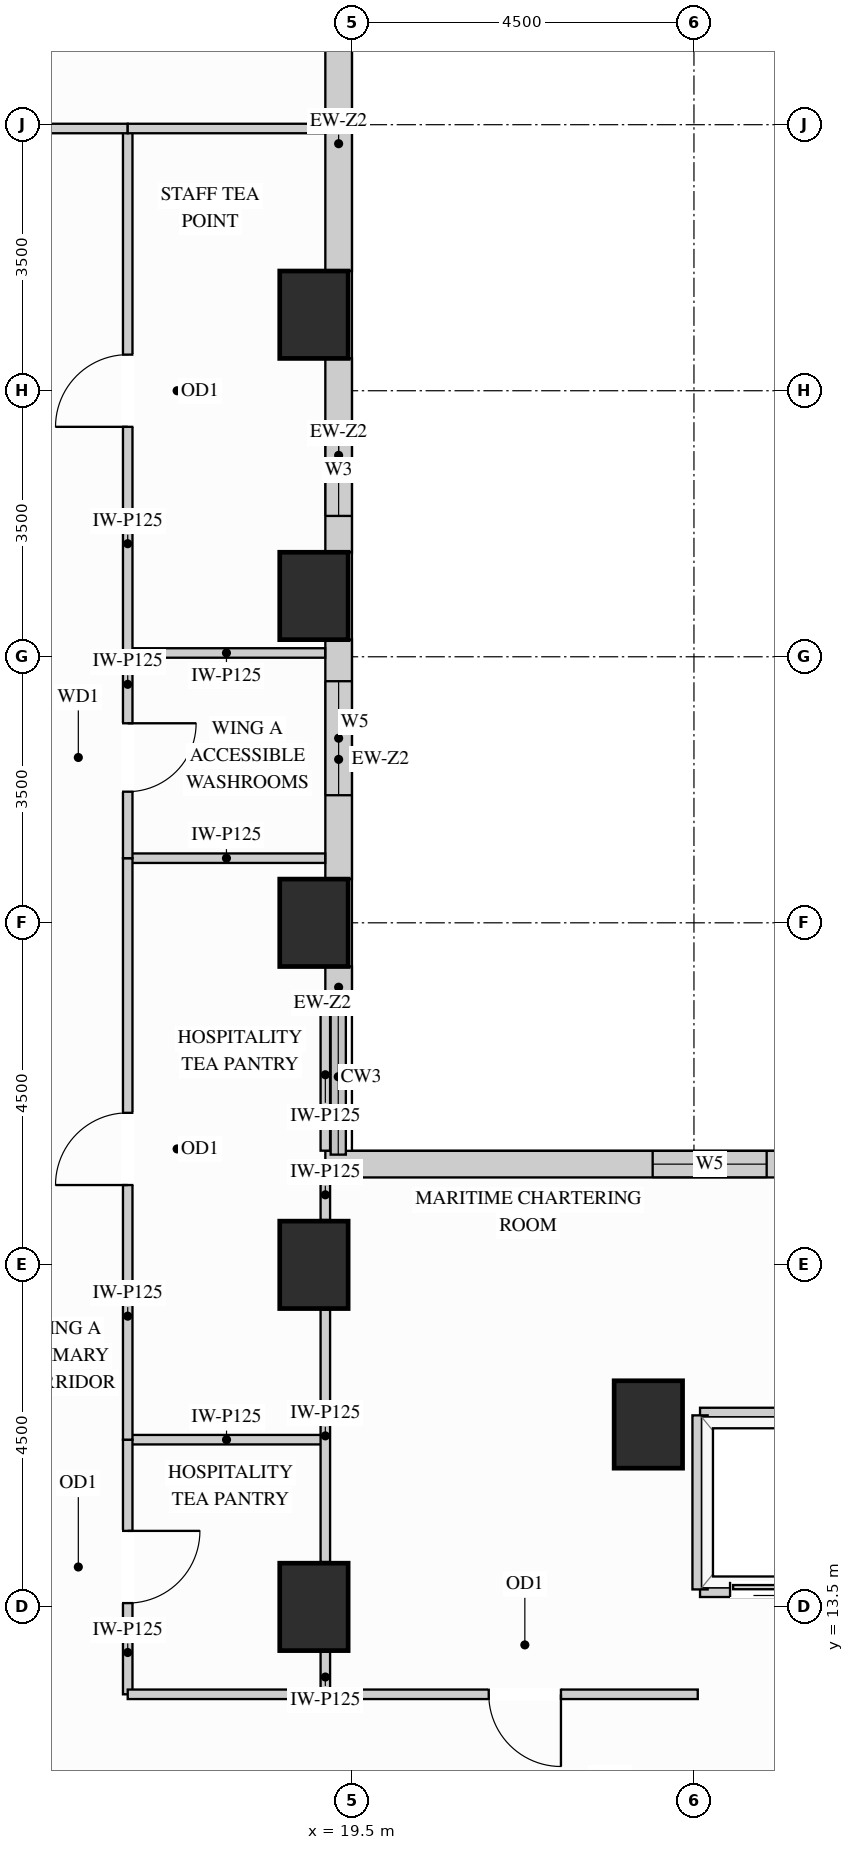
"""IFC4 building model, lengths in metres.
Left out: names, types, materials, properties, quantities, classifications, styles, units other than length and angle.
Written with IfcOpenShell. Run it as: python <this file> out.ifc"""

import sys

from ifc_helpers import new_model, si_unit, direction, frame, frame_2d, origin, origin_2d, place, context, subcontext, project, spatial, rectangle, extrude, source, transform, mapped, element, fill, save


model = new_model("IFC4")
c1 = context("Model", 3, precision=1e-05, world=origin(), true_north=direction((0.0, 1.0)))
c2 = subcontext(c1, "Body", "Model", "MODEL_VIEW")
j1 = project(units=[si_unit("LENGTHUNIT", "METRE"), si_unit("PLANEANGLEUNIT", "RADIAN")], contexts=[c1])
p1 = place(None, origin())
s1 = spatial("IfcSite", under=j1, at=p1, CompositionType="ELEMENT")
p2 = place(p1, origin())
s2 = spatial("IfcBuilding", under=s1, at=p2, CompositionType="ELEMENT")
p3 = place(p2, frame((0.0, 0.0, 124.2)))
s3 = spatial("IfcBuildingStorey", under=s2, at=p3, CompositionType="ELEMENT", Elevation=124.2)
m1 = source(origin(), c2, "Body", "SweptSolid", [
    extrude(rectangle(XDim=0.9, YDim=1.15, at=origin_2d()), origin(), (0.0, 0.0, 1.0), 3.38),
])
for number, where, z_axis, x_axis in (
    (1, (19.0, 13.5, 0.0), (0.0, 0.0, 1.0), (1.0, 0.0, 0.0)),
    (2, (19.0, 18.0, 0.0), (0.0, 0.0, 1.0), (1.0, 0.0, 0.0)),
    (3, (19.0, 22.5, 0.0), (0.0, 0.0, 1.0), (1.0, 0.0, 0.0)),
    (4, (19.0, 26.8, 0.0), (0.0, 0.0, 1.0), (1.0, 0.0, 0.0)),
    (5, (19.0, 30.5, 0.0), (0.0, 0.0, 1.0), (1.0, 0.0, 0.0)),
    (6, (23.4, 15.9, 0.0), (0.0, 0.0, 1.0), (1.0, 0.0, 0.0)),
):
    element("IfcColumn", number, at=place(p3, frame(where, z_axis=z_axis, x_axis=x_axis)), inside=s3, PredefinedType="COLUMN", context=c2, shape_type="MappedRepresentation", body=[
        mapped(m1, transform((0.0, 0.0, 0.0), x_axis=(1.0, 0.0, 0.0), y_axis=(0.0, 1.0, 0.0), z_axis=(0.0, 0.0, 1.0))),
    ])
m2 = source(origin(), c2, "Body", "SweptSolid", [
    extrude(rectangle(XDim=0.427, YDim=0.35, at=frame_2d((0.213, 0.0))), origin(), (0.0, 0.0, 1.0), 2.519),
])
p4 = place(p3, frame((19.325, 21.5, 0.0), z_axis=(0.0, 0.0, 1.0), x_axis=(0.0, 1.0, 0.0)))
e7 = element("IfcWall", 7, at=p4, inside=s3, PredefinedType="SOLIDWALL", context=c2, shape_type="MappedRepresentation", body=[
    mapped(m2, transform((0.0, 0.0, 0.0), x_axis=(1.0, 0.0, 0.0), y_axis=(0.0, 1.0, 0.0), z_axis=(0.0, 0.0, 1.0))),
])
p5 = place(p3, frame((19.325, 23.073, 0.0), z_axis=(0.0, 0.0, 1.0), x_axis=(0.0, 1.0, 0.0)))
e8 = element("IfcWall", 8, at=p5, inside=s3, PredefinedType="SOLIDWALL", context=c2, shape_type="SweptSolid", body=[
    extrude(rectangle(XDim=3.154, YDim=0.35, at=frame_2d((1.577, 0.0))), origin(), (0.0, 0.0, 1.0), 2.519),
])
p6 = place(p5, frame((1.105, 0.0, 0.78)))
e9 = element("IfcOpeningElement", 9, at=p6, cuts=e8, PredefinedType="OPENING", context=c2, shape_type="SweptSolid", body=[
    extrude(rectangle(XDim=1.5, YDim=1.559, at=frame_2d((0.75, 0.78))), frame((0.0, 0.185, 0.0), z_axis=(0.0, -1.0, 0.0), x_axis=(1.0, 0.0, 0.0)), (0.0, 0.0, 1.0), 0.37),
])
p7 = place(p3, frame((19.325, 27.373, 0.0), z_axis=(0.0, 0.0, 1.0), x_axis=(0.0, 1.0, 0.0)))
e10 = element("IfcWall", 10, at=p7, inside=s3, PredefinedType="SOLIDWALL", context=c2, shape_type="SweptSolid", body=[
    extrude(rectangle(XDim=2.554, YDim=0.35, at=frame_2d((1.277, 0.0))), origin(), (0.0, 0.0, 1.0), 2.519),
])
p8 = place(p7, frame((0.48, 0.0, 0.78)))
e11 = element("IfcOpeningElement", 11, at=p8, cuts=e10, PredefinedType="OPENING", context=c2, shape_type="SweptSolid", body=[
    extrude(rectangle(XDim=1.2, YDim=1.559, at=frame_2d((0.6, 0.78))), frame((0.0, 0.185, 0.0), z_axis=(0.0, -1.0, 0.0), x_axis=(1.0, 0.0, 0.0)), (0.0, 0.0, 1.0), 0.37),
])
m3 = source(origin(), c2, "Body", "SweptSolid", [
    extrude(rectangle(XDim=3.354, YDim=0.35, at=frame_2d((1.677, 0.0))), origin(), (0.0, 0.0, 1.0), 2.519),
])
p9 = place(p3, frame((19.325, 31.073, 0.0), z_axis=(0.0, 0.0, 1.0), x_axis=(0.0, 1.0, 0.0)))
e12 = element("IfcWall", 12, at=p9, inside=s3, PredefinedType="SOLIDWALL", context=c2, shape_type="MappedRepresentation", body=[
    mapped(m3, transform((0.0, 0.0, 0.0), x_axis=(1.0, 0.0, 0.0), y_axis=(0.0, 1.0, 0.0), z_axis=(0.0, 0.0, 1.0))),
])
p10 = place(p3, frame((34.75, 19.325, 0.0), z_axis=(0.0, 0.0, 1.0), x_axis=(-1.0, 0.0, 0.0)))
e13 = element("IfcWall", 13, at=p10, inside=s3, PredefinedType="SOLIDWALL", context=c2, shape_type="SweptSolid", body=[
    extrude(rectangle(XDim=15.6, YDim=0.35, at=frame_2d((7.8, 0.0))), origin(), (0.0, 0.0, 1.0), 3.365),
])
p11 = place(p10, frame((4.307, 0.0, 0.78)))
e14 = element("IfcOpeningElement", 14, at=p11, cuts=e13, PredefinedType="OPENING", context=c2, shape_type="SweptSolid", body=[
    extrude(rectangle(XDim=1.5, YDim=2.0, at=frame_2d((0.75, 1.0))), frame((0.0, 0.185, 0.0), z_axis=(0.0, -1.0, 0.0), x_axis=(1.0, 0.0, 0.0)), (0.0, 0.0, 1.0), 0.37),
])
p12 = place(p10, frame((9.793, 0.0, 0.78)))
e15 = element("IfcOpeningElement", 15, at=p12, cuts=e13, PredefinedType="OPENING", context=c2, shape_type="SweptSolid", body=[
    extrude(rectangle(XDim=1.5, YDim=2.0, at=frame_2d((0.75, 1.0))), frame((0.0, 0.185, 0.0), z_axis=(0.0, -1.0, 0.0), x_axis=(1.0, 0.0, 0.0)), (0.0, 0.0, 1.0), 0.37),
])
m4 = source(origin(), c2, "Body", "SweptSolid", [
    extrude(rectangle(XDim=2.6, YDim=0.125, at=frame_2d((1.3, 0.0))), origin(), (0.0, 0.0, 1.0), 3.365),
])
p13 = place(p3, frame((16.55, 15.7, 0.0), z_axis=(0.0, 0.0, 1.0), x_axis=(1.0, 0.0, 0.0)))
e16 = element("IfcWall", 16, at=p13, inside=s3, PredefinedType="PARTITIONING", context=c2, shape_type="MappedRepresentation", body=[
    mapped(m4, transform((0.0, 0.0, 0.0), x_axis=(1.0, 0.0, 0.0), y_axis=(0.0, 1.0, 0.0), z_axis=(0.0, 0.0, 1.0))),
])
m5 = source(origin(), c2, "Body", "SweptSolid", [
    extrude(rectangle(XDim=2.598, YDim=0.125, at=frame_2d((1.299, 0.0))), origin(), (0.0, 0.0, 1.0), 3.365),
])
for number, where, z_axis, x_axis in (
    (17, (16.55, 23.35, 0.0), (0.0, 0.0, 1.0), (1.0, 0.0, 0.0)),
    (18, (16.55, 26.05, 0.0), (0.0, 0.0, 1.0), (1.0, 0.0, 0.0)),
):
    element("IfcWall", number, at=place(p3, frame(where, z_axis=z_axis, x_axis=x_axis)), inside=s3, PredefinedType="PARTITIONING", context=c2, shape_type="MappedRepresentation", body=[
        mapped(m5, transform((0.0, 0.0, 0.0), x_axis=(1.0, 0.0, 0.0), y_axis=(0.0, 1.0, 0.0), z_axis=(0.0, 0.0, 1.0))),
    ])
m6 = source(origin(), c2, "Body", "SweptSolid", [
    extrude(rectangle(XDim=0.56, YDim=0.125, at=frame_2d((0.28, 0.0))), origin(), (0.0, 0.0, 1.0), 2.677),
])
p14 = place(p3, frame((19.15, 12.35, 0.0), z_axis=(0.0, 0.0, 1.0), x_axis=(0.0, 1.0, 0.0)))
e19 = element("IfcWall", 19, at=p14, inside=s3, PredefinedType="PARTITIONING", context=c2, shape_type="MappedRepresentation", body=[
    mapped(m6, transform((0.0, 0.0, 0.0), x_axis=(1.0, 0.0, 0.0), y_axis=(0.0, 1.0, 0.0), z_axis=(0.0, 0.0, 1.0))),
])
m7 = source(origin(), c2, "Body", "SweptSolid", [
    extrude(rectangle(XDim=3.32, YDim=0.125, at=frame_2d((1.66, 0.0))), origin(), (0.0, 0.0, 1.0), 2.677),
])
p15 = place(p3, frame((19.15, 14.09, 0.0), z_axis=(0.0, 0.0, 1.0), x_axis=(0.0, 1.0, 0.0)))
e20 = element("IfcWall", 20, at=p15, inside=s3, PredefinedType="PARTITIONING", context=c2, shape_type="MappedRepresentation", body=[
    mapped(m7, transform((0.0, 0.0, 0.0), x_axis=(1.0, 0.0, 0.0), y_axis=(0.0, 1.0, 0.0), z_axis=(0.0, 0.0, 1.0))),
])
m8 = source(origin(), c2, "Body", "SweptSolid", [
    extrude(rectangle(XDim=0.558, YDim=0.125, at=frame_2d((0.279, 0.0))), origin(), (0.0, 0.0, 1.0), 2.519),
])
p16 = place(p3, frame((19.15, 18.59, 0.0), z_axis=(0.0, 0.0, 1.0), x_axis=(0.0, 1.0, 0.0)))
e21 = element("IfcWall", 21, at=p16, inside=s3, PredefinedType="PARTITIONING", context=c2, shape_type="MappedRepresentation", body=[
    mapped(m8, transform((0.0, 0.0, 0.0), x_axis=(1.0, 0.0, 0.0), y_axis=(0.0, 1.0, 0.0), z_axis=(0.0, 0.0, 1.0))),
])
m9 = source(origin(), c2, "Body", "SweptSolid", [
    extrude(rectangle(XDim=1.998, YDim=0.125, at=frame_2d((0.999, 0.0))), origin(), (0.0, 0.0, 1.0), 2.519),
])
p17 = place(p3, frame((19.15, 19.502, 0.0), z_axis=(0.0, 0.0, 1.0), x_axis=(0.0, 1.0, 0.0)))
e22 = element("IfcWall", 22, at=p17, inside=s3, PredefinedType="PARTITIONING", context=c2, shape_type="MappedRepresentation", body=[
    mapped(m9, transform((0.0, 0.0, 0.0), x_axis=(1.0, 0.0, 0.0), y_axis=(0.0, 1.0, 0.0), z_axis=(0.0, 0.0, 1.0))),
])
p18 = place(p3, frame((16.55, 12.35, 0.0), z_axis=(0.0, 0.0, 1.0), x_axis=(0.0, 1.0, 0.0)))
e23 = element("IfcWall", 23, at=p18, inside=s3, PredefinedType="PARTITIONING", context=c2, shape_type="SweptSolid", body=[
    extrude(rectangle(XDim=3.35, YDim=0.125, at=frame_2d((1.675, 0.0))), origin(), (0.0, 0.0, 1.0), 3.365),
])
p19 = place(p18, frame((1.2, 0.0, 0.0)))
e24 = element("IfcOpeningElement", 24, at=p19, cuts=e23, PredefinedType="OPENING", context=c2, shape_type="SweptSolid", body=[
    extrude(rectangle(XDim=0.95, YDim=2.15, at=frame_2d((0.475, 1.075))), frame((0.0, 0.073, 0.0), z_axis=(0.0, -1.0, 0.0), x_axis=(1.0, 0.0, 0.0)), (0.0, 0.0, 1.0), 0.145),
])
p20 = place(p3, frame((16.55, 15.7, 0.0), z_axis=(0.0, 0.0, 1.0), x_axis=(0.0, 1.0, 0.0)))
e25 = element("IfcWall", 25, at=p20, inside=s3, PredefinedType="PARTITIONING", context=c2, shape_type="SweptSolid", body=[
    extrude(rectangle(XDim=7.65, YDim=0.125, at=frame_2d((3.825, 0.0))), origin(), (0.0, 0.0, 1.0), 3.365),
])
p21 = place(p20, frame((3.35, 0.0, 0.0)))
e26 = element("IfcOpeningElement", 26, at=p21, cuts=e25, PredefinedType="OPENING", context=c2, shape_type="SweptSolid", body=[
    extrude(rectangle(XDim=0.95, YDim=2.15, at=frame_2d((0.475, 1.075))), frame((0.0, 0.073, 0.0), z_axis=(0.0, -1.0, 0.0), x_axis=(1.0, 0.0, 0.0)), (0.0, 0.0, 1.0), 0.145),
])
p22 = place(p3, frame((16.55, 26.05, 0.0), z_axis=(0.0, 0.0, 1.0), x_axis=(0.0, 1.0, 0.0)))
e27 = element("IfcWall", 27, at=p22, inside=s3, PredefinedType="PARTITIONING", context=c2, shape_type="SweptSolid", body=[
    extrude(rectangle(XDim=6.9, YDim=0.125, at=frame_2d((3.45, 0.0))), origin(), (0.0, 0.0, 1.0), 3.365),
])
p23 = place(p22, frame((2.975, 0.0, 0.0)))
e28 = element("IfcOpeningElement", 28, at=p23, cuts=e27, PredefinedType="OPENING", context=c2, shape_type="SweptSolid", body=[
    extrude(rectangle(XDim=0.95, YDim=2.15, at=frame_2d((0.475, 1.075))), frame((0.0, 0.073, 0.0), z_axis=(0.0, -1.0, 0.0), x_axis=(1.0, 0.0, 0.0)), (0.0, 0.0, 1.0), 0.145),
])
p24 = place(p3, frame((16.55, 23.35, 0.0), z_axis=(0.0, 0.0, 1.0), x_axis=(0.0, 1.0, 0.0)))
e29 = element("IfcWall", 29, at=p24, inside=s3, PredefinedType="PARTITIONING", context=c2, shape_type="SweptSolid", body=[
    extrude(rectangle(XDim=2.7, YDim=0.125, at=frame_2d((1.35, 0.0))), origin(), (0.0, 0.0, 1.0), 3.365),
])
p25 = place(p24, frame((0.875, 0.0, 0.0)))
e30 = element("IfcOpeningElement", 30, at=p25, cuts=e29, PredefinedType="OPENING", context=c2, shape_type="SweptSolid", body=[
    extrude(rectangle(XDim=0.9, YDim=2.15, at=frame_2d((0.45, 1.075))), frame((0.0, 0.073, 0.0), z_axis=(0.0, -1.0, 0.0), x_axis=(1.0, 0.0, 0.0)), (0.0, 0.0, 1.0), 0.145),
])
p26 = place(p3, frame((2.45, 32.95, 0.0), z_axis=(0.0, 0.0, 1.0), x_axis=(1.0, 0.0, 0.0)))
e31 = element("IfcWall", 31, at=p26, inside=s3, PredefinedType="PARTITIONING", context=c2, shape_type="SweptSolid", body=[
    extrude(rectangle(XDim=14.1, YDim=0.125, at=frame_2d((7.05, 0.0))), origin(), (0.0, 0.0, 1.0), 3.365),
])
p27 = place(p26, frame((6.575, 0.0, 0.0)))
e32 = element("IfcOpeningElement", 32, at=p27, cuts=e31, PredefinedType="OPENING", context=c2, shape_type="SweptSolid", body=[
    extrude(rectangle(XDim=0.95, YDim=2.15, at=frame_2d((0.475, 1.075))), frame((0.0, 0.073, 0.0), z_axis=(0.0, -1.0, 0.0), x_axis=(1.0, 0.0, 0.0)), (0.0, 0.0, 1.0), 0.145),
])
p28 = place(p3, frame((16.55, 32.95, 0.0), z_axis=(0.0, 0.0, 1.0), x_axis=(1.0, 0.0, 0.0)))
e33 = element("IfcWall", 33, at=p28, inside=s3, PredefinedType="PARTITIONING", context=c2, shape_type="MappedRepresentation", body=[
    mapped(m5, transform((0.0, 0.0, 0.0), x_axis=(1.0, 0.0, 0.0), y_axis=(0.0, 1.0, 0.0), z_axis=(0.0, 0.0, 1.0))),
])
m10 = source(origin(), c2, "Body", "SweptSolid", [
    extrude(rectangle(XDim=2.95, YDim=0.125, at=frame_2d((1.475, 0.0))), origin(), (0.0, 0.0, 1.0), 3.365),
])
p29 = place(p3, frame((16.55, 12.35, 0.0), z_axis=(0.0, 0.0, 1.0), x_axis=(1.0, 0.0, 0.0)))
e34 = element("IfcWall", 34, at=p29, inside=s3, PredefinedType="PARTITIONING", context=c2, shape_type="MappedRepresentation", body=[
    mapped(m10, transform((0.0, 0.0, 0.0), x_axis=(1.0, 0.0, 0.0), y_axis=(0.0, 1.0, 0.0), z_axis=(0.0, 0.0, 1.0))),
])
p30 = place(p3, frame((19.5, 12.35, 0.0), z_axis=(0.0, 0.0, 1.0), x_axis=(1.0, 0.0, 0.0)))
e35 = element("IfcWall", 35, at=p30, inside=s3, PredefinedType="PARTITIONING", context=c2, shape_type="SweptSolid", body=[
    extrude(rectangle(XDim=4.55, YDim=0.125, at=frame_2d((2.275, 0.0))), origin(), (0.0, 0.0, 1.0), 3.365),
])
p31 = place(p30, frame((1.8, 0.0, 0.0)))
e36 = element("IfcOpeningElement", 36, at=p31, cuts=e35, PredefinedType="OPENING", context=c2, shape_type="SweptSolid", body=[
    extrude(rectangle(XDim=0.95, YDim=2.15, at=frame_2d((0.475, 1.075))), frame((0.0, 0.073, 0.0), z_axis=(0.0, -1.0, 0.0), x_axis=(1.0, 0.0, 0.0)), (0.0, 0.0, 1.0), 0.145),
])
m11 = source(origin(), c2, "Body", "SweptSolid", [
    extrude(rectangle(XDim=1.89, YDim=0.2, at=frame_2d((0.945, 0.0))), origin(), (0.0, 0.0, 1.0), 2.677),
])
p32 = place(p3, frame((24.08, 16.02, 0.0), z_axis=(0.0, 0.0, 1.0), x_axis=(1.0, 0.0, 0.0)))
e37 = element("IfcWall", 37, at=p32, inside=s3, PredefinedType="PARTITIONING", context=c2, shape_type="MappedRepresentation", body=[
    mapped(m11, transform((0.0, 0.0, 0.0), x_axis=(1.0, 0.0, 0.0), y_axis=(0.0, 1.0, 0.0), z_axis=(0.0, 0.0, 1.0))),
])
p33 = place(p3, frame((24.08, 13.73, 0.0), z_axis=(0.0, 0.0, 1.0), x_axis=(1.0, 0.0, 0.0)))
e38 = element("IfcWall", 38, at=p33, inside=s3, PredefinedType="PARTITIONING", context=c2, shape_type="SweptSolid", body=[
    extrude(rectangle(XDim=1.89, YDim=0.2, at=frame_2d((0.945, 0.0))), origin(), (0.0, 0.0, 1.0), 2.446),
])
p34 = place(p33, frame((0.395, 0.0, 0.0)))
e39 = element("IfcOpeningElement", 39, at=p34, cuts=e38, PredefinedType="OPENING", context=c2, shape_type="SweptSolid", body=[
    extrude(rectangle(XDim=1.1, YDim=2.2, at=frame_2d((0.55, 1.1))), frame((0.0, 0.11, 0.0), z_axis=(0.0, -1.0, 0.0), x_axis=(1.0, 0.0, 0.0)), (0.0, 0.0, 1.0), 0.22),
])
m12 = source(origin(), c2, "Body", "SweptSolid", [
    extrude(rectangle(XDim=2.29, YDim=0.2, at=frame_2d((1.145, 0.0))), origin(), (0.0, 0.0, 1.0), 3.365),
])
p35 = place(p3, frame((24.08, 13.73, 0.0), z_axis=(0.0, 0.0, 1.0), x_axis=(0.0, 1.0, 0.0)))
e40 = element("IfcWall", 40, at=p35, inside=s3, PredefinedType="PARTITIONING", context=c2, shape_type="MappedRepresentation", body=[
    mapped(m12, transform((0.0, 0.0, 0.0), x_axis=(1.0, 0.0, 0.0), y_axis=(0.0, 1.0, 0.0), z_axis=(0.0, 0.0, 1.0))),
])
m13 = source(origin(), c2, "Body", "SweptSolid", [
    extrude(rectangle(XDim=1.1, YDim=2.2, at=frame_2d((0.55, 1.1))), frame((0.0, 0.025, 0.0), z_axis=(0.0, -1.0, 0.0), x_axis=(1.0, 0.0, 0.0)), (0.0, 0.0, 1.0), 0.05),
])
p36 = place(p34, origin())
e41 = element("IfcDoor", 41, at=p36, inside=s3, OperationType="SLIDING_TO_LEFT", PredefinedType="DOOR", context=c2, shape_type="MappedRepresentation", body=[
    mapped(m13, transform((0.0, 0.0, 0.0), x_axis=(1.0, 0.0, 0.0), y_axis=(0.0, 1.0, 0.0), z_axis=(0.0, 0.0, 1.0))),
])
fill(e39, e41)
m14 = source(origin(), c2, "Body", "SweptSolid", [
    extrude(rectangle(XDim=0.95, YDim=2.15, at=frame_2d((0.475, 1.075))), frame((0.0, 0.025, 0.0), z_axis=(0.0, -1.0, 0.0), x_axis=(1.0, 0.0, 0.0)), (0.0, 0.0, 1.0), 0.05),
])
p37 = place(p19, origin())
e42 = element("IfcDoor", 42, at=p37, inside=s3, OperationType="SINGLE_SWING_RIGHT", PredefinedType="DOOR", context=c2, shape_type="MappedRepresentation", body=[
    mapped(m14, transform((0.0, 0.0, 0.0), x_axis=(1.0, 0.0, 0.0), y_axis=(0.0, 1.0, 0.0), z_axis=(0.0, 0.0, 1.0))),
])
fill(e24, e42)
p38 = place(p21, origin())
e43 = element("IfcDoor", 43, at=p38, inside=s3, OperationType="SINGLE_SWING_LEFT", PredefinedType="DOOR", context=c2, shape_type="MappedRepresentation", body=[
    mapped(m14, transform((0.0, 0.0, 0.0), x_axis=(1.0, 0.0, 0.0), y_axis=(0.0, 1.0, 0.0), z_axis=(0.0, 0.0, 1.0))),
])
fill(e26, e43)
p39 = place(p23, origin())
e44 = element("IfcDoor", 44, at=p39, inside=s3, OperationType="SINGLE_SWING_LEFT", PredefinedType="DOOR", context=c2, shape_type="MappedRepresentation", body=[
    mapped(m14, transform((0.0, 0.0, 0.0), x_axis=(1.0, 0.0, 0.0), y_axis=(0.0, 1.0, 0.0), z_axis=(0.0, 0.0, 1.0))),
])
fill(e28, e44)
p40 = place(p31, origin())
e45 = element("IfcDoor", 45, at=p40, inside=s3, OperationType="SINGLE_SWING_RIGHT", PredefinedType="DOOR", context=c2, shape_type="MappedRepresentation", body=[
    mapped(m14, transform((0.0, 0.0, 0.0), x_axis=(1.0, 0.0, 0.0), y_axis=(0.0, 1.0, 0.0), z_axis=(0.0, 0.0, 1.0))),
])
fill(e36, e45)
m15 = source(origin(), c2, "Body", "SweptSolid", [
    extrude(rectangle(XDim=0.9, YDim=2.15, at=frame_2d((0.45, 1.075))), frame((0.0, 0.025, 0.0), z_axis=(0.0, -1.0, 0.0), x_axis=(1.0, 0.0, 0.0)), (0.0, 0.0, 1.0), 0.05),
])
p41 = place(p25, origin())
e46 = element("IfcDoor", 46, at=p41, inside=s3, OperationType="SINGLE_SWING_RIGHT", PredefinedType="DOOR", context=c2, shape_type="MappedRepresentation", body=[
    mapped(m15, transform((0.0, 0.0, 0.0), x_axis=(1.0, 0.0, 0.0), y_axis=(0.0, 1.0, 0.0), z_axis=(0.0, 0.0, 1.0))),
])
fill(e30, e46)
m16 = source(origin(), c2, "Body", "SweptSolid", [
    extrude(rectangle(XDim=1.2, YDim=1.559, at=frame_2d((0.6, 0.78))), frame((0.0, 0.03, 0.0), z_axis=(0.0, -1.0, 0.0), x_axis=(1.0, 0.0, 0.0)), (0.0, 0.0, 1.0), 0.06),
])
p42 = place(p8, origin())
e47 = element("IfcWindow", 47, at=p42, inside=s3, PartitioningType="SINGLE_PANEL", PredefinedType="WINDOW", context=c2, shape_type="MappedRepresentation", body=[
    mapped(m16, transform((0.0, 0.0, 0.0), x_axis=(1.0, 0.0, 0.0), y_axis=(0.0, 1.0, 0.0), z_axis=(0.0, 0.0, 1.0))),
])
fill(e11, e47)
m17 = source(origin(), c2, "Body", "SweptSolid", [
    extrude(rectangle(XDim=1.5, YDim=1.559, at=frame_2d((0.75, 0.78))), frame((0.0, 0.03, 0.0), z_axis=(0.0, -1.0, 0.0), x_axis=(1.0, 0.0, 0.0)), (0.0, 0.0, 1.0), 0.06),
])
p43 = place(p6, origin())
e48 = element("IfcWindow", 48, at=p43, inside=s3, PartitioningType="SINGLE_PANEL", PredefinedType="WINDOW", context=c2, shape_type="MappedRepresentation", body=[
    mapped(m17, transform((0.0, 0.0, 0.0), x_axis=(1.0, 0.0, 0.0), y_axis=(0.0, 1.0, 0.0), z_axis=(0.0, 0.0, 1.0))),
])
fill(e9, e48)
m18 = source(origin(), c2, "Body", "SweptSolid", [
    extrude(rectangle(XDim=1.5, YDim=2.0, at=frame_2d((0.75, 1.0))), frame((0.0, 0.03, 0.0), z_axis=(0.0, -1.0, 0.0), x_axis=(1.0, 0.0, 0.0)), (0.0, 0.0, 1.0), 0.06),
])
p44 = place(p12, origin())
e49 = element("IfcWindow", 49, at=p44, inside=s3, PartitioningType="SINGLE_PANEL", PredefinedType="WINDOW", context=c2, shape_type="MappedRepresentation", body=[
    mapped(m18, transform((0.0, 0.0, 0.0), x_axis=(1.0, 0.0, 0.0), y_axis=(0.0, 1.0, 0.0), z_axis=(0.0, 0.0, 1.0))),
])
fill(e15, e49)
save(model, sys.argv[1])
